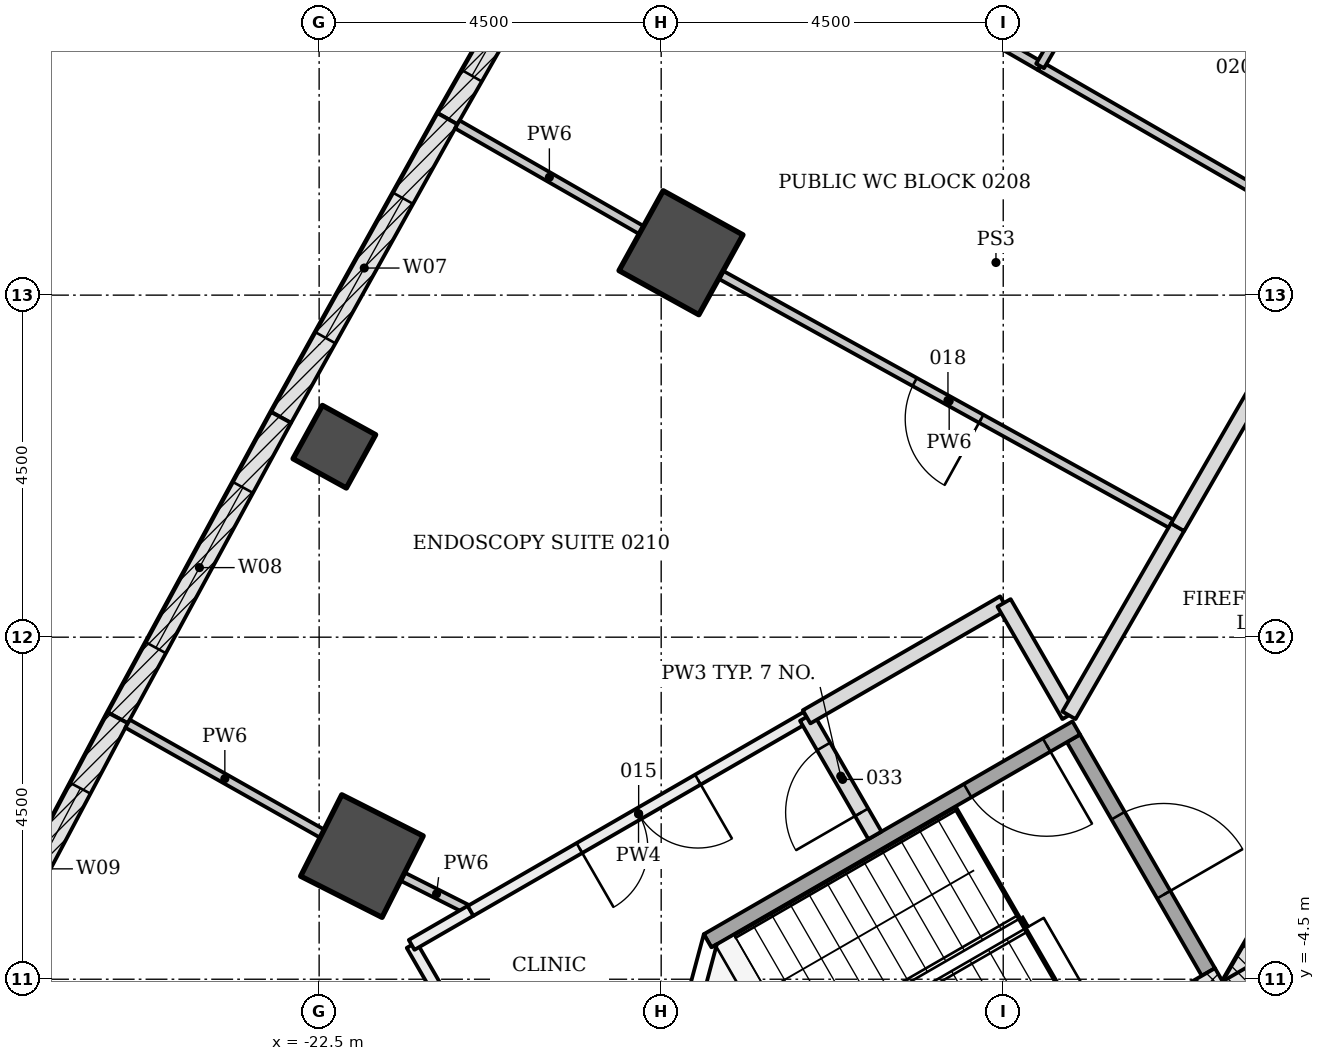
"""IFC4 building model, lengths in metres.
Left out: names, types, materials, properties, quantities, classifications, styles, units other than length and angle.
Written with IfcOpenShell. Run it as: python <this file> out.ifc"""

import sys

from ifc_helpers import new_model, si_unit, direction, frame, frame_2d, origin, origin_2d, place, context, subcontext, project, spatial, polyline, rectangle, outline, extrude, element, fill, save


model = new_model("IFC4")
c1 = context("Model", 3, precision=1e-05, world=origin(), true_north=direction((0.0, 1.0)))
c2 = subcontext(c1, "Body", "Model", "MODEL_VIEW")
j1 = project(units=[si_unit("LENGTHUNIT", "METRE"), si_unit("PLANEANGLEUNIT", "RADIAN")], contexts=[c1])
p1 = place(None, origin())
s1 = spatial("IfcSite", under=j1, at=p1, CompositionType="ELEMENT")
p2 = place(p1, origin())
s2 = spatial("IfcBuilding", under=s1, at=p2, CompositionType="ELEMENT")
p3 = place(p2, frame((0.0, 0.0, 10.5)))
s3 = spatial("IfcBuildingStorey", under=s2, at=p3, CompositionType="ELEMENT", Elevation=10.5)
for number, where, z_axis, x_axis in (
    (1, (-17.739, 5.058, -0.25), (0.0, 0.0, 1.0), (-0.875, 0.484, 0.0)),
    (2, (-21.937, -2.88, -0.25), (0.0, 0.0, 1.0), (-0.893, 0.451, 0.0)),
):
    element("IfcColumn", number, at=place(p3, frame(where, z_axis=z_axis, x_axis=x_axis)), inside=s3, PredefinedType="COLUMN", context=c2, shape_type="SweptSolid", body=[
        extrude(rectangle(XDim=1.2, YDim=1.2, at=origin_2d()), origin(), (0.0, 0.0, 1.0), 4.5),
    ])
p4 = place(p3, frame((-22.3, 2.506, -0.25), z_axis=(0.0, 0.0, 1.0), x_axis=(-0.87611131274, 0.482108875348, 0.0)))
e3 = element("IfcColumn", 3, at=p4, inside=s3, PredefinedType="COLUMN", context=c2, shape_type="SweptSolid", body=[
    extrude(rectangle(XDim=0.8, YDim=0.8, at=origin_2d()), origin(), (0.0, 0.0, 1.0), 4.5),
])
p5 = place(p3, frame((-1.083, 11.281, -0.25), z_axis=(0.0, 0.0, 1.0), x_axis=(-0.500001446645, -0.866024568562, 0.0)))
e4 = element("IfcWall", 4, at=p5, inside=s3, PredefinedType="SHEAR", context=c2, shape_type="SweptSolid", body=[
    extrude(rectangle(XDim=18.458, YDim=0.7, at=frame_2d((9.229, 0.0))), origin(), (0.0, 0.0, 1.0), 4.5),
])
p6 = place(p5, frame((8.979, 0.0, 0.25)))
e5 = element("IfcOpeningElement", 5, at=p6, cuts=e4, PredefinedType="OPENING", context=c2, shape_type="SweptSolid", body=[
    extrude(rectangle(XDim=1.2, YDim=2.1, at=frame_2d((0.6, 1.05))), frame((0.0, 0.36, 0.0), z_axis=(0.0, -1.0, 0.0), x_axis=(1.0, 0.0, 0.0)), (0.0, 0.0, 1.0), 0.72),
])
p7 = place(p5, frame((11.029, 0.0, 0.25)))
e6 = element("IfcOpeningElement", 6, at=p7, cuts=e4, PredefinedType="OPENING", context=c2, shape_type="SweptSolid", body=[
    extrude(rectangle(XDim=1.2, YDim=2.1, at=frame_2d((0.6, 1.05))), frame((0.0, 0.36, 0.0), z_axis=(0.0, -1.0, 0.0), x_axis=(1.0, 0.0, 0.0)), (0.0, 0.0, 1.0), 0.72),
])
p8 = place(p3, frame((-10.311, -4.353, -0.25), z_axis=(0.0, 0.0, 1.0), x_axis=(0.500042739161, -0.866000726912, 0.0)))
e7 = element("IfcWall", 7, at=p8, inside=s3, PredefinedType="SHEAR", context=c2, shape_type="SweptSolid", body=[
    extrude(rectangle(XDim=2.771, YDim=0.7, at=frame_2d((1.386, 0.0))), origin(), (0.0, 0.0, 1.0), 4.5),
])
p9 = place(p3, frame((-20.811, 6.823, 0.0), z_axis=(0.0, 0.0, 1.0), x_axis=(0.495524760411, 0.868593812907, 0.0)))
e8 = element("IfcWall", 8, at=p9, inside=s3, PredefinedType="NOTDEFINED", context=c2, shape_type="SweptSolid", body=[
    extrude(rectangle(XDim=4.496, YDim=0.3, at=frame_2d((2.248, 0.0))), origin(), (0.0, 0.0, 1.0), 4.25),
])
p10 = place(p9, frame((0.648, 0.0, 0.8)))
e9 = element("IfcOpeningElement", 9, at=p10, cuts=e8, PredefinedType="OPENING", context=c2, shape_type="SweptSolid", body=[
    extrude(rectangle(XDim=3.2, YDim=2.7, at=frame_2d((1.6, 1.35))), frame((0.0, 0.16, 0.0), z_axis=(0.0, -1.0, 0.0), x_axis=(1.0, 0.0, 0.0)), (0.0, 0.0, 1.0), 0.32),
])
p11 = place(p3, frame((-23.0, 2.893, 0.0), z_axis=(0.0, 0.0, 1.0), x_axis=(0.486606252415, 0.873621402617, 0.0)))
e10 = element("IfcWall", 10, at=p11, inside=s3, PredefinedType="NOTDEFINED", context=c2, shape_type="SweptSolid", body=[
    extrude(rectangle(XDim=4.496, YDim=0.3, at=frame_2d((2.248, 0.0))), origin(), (0.0, 0.0, 1.0), 4.25),
])
p12 = place(p11, frame((1.198, 0.0, 0.8)))
e11 = element("IfcOpeningElement", 11, at=p12, cuts=e10, PredefinedType="OPENING", context=c2, shape_type="SweptSolid", body=[
    extrude(rectangle(XDim=2.1, YDim=3.0, at=frame_2d((1.05, 1.5))), frame((0.0, 0.16, 0.0), z_axis=(0.0, -1.0, 0.0), x_axis=(1.0, 0.0, 0.0)), (0.0, 0.0, 1.0), 0.32),
])
p13 = place(p3, frame((-25.148, -1.06, 0.0), z_axis=(0.0, 0.0, 1.0), x_axis=(0.477577109439, 0.878589838628, 0.0)))
e12 = element("IfcWall", 12, at=p13, inside=s3, PredefinedType="NOTDEFINED", context=c2, shape_type="SweptSolid", body=[
    extrude(rectangle(XDim=4.496, YDim=0.3, at=frame_2d((2.248, 0.0))), origin(), (0.0, 0.0, 1.0), 4.25),
])
p14 = place(p13, frame((1.048, 0.0, 0.9)))
e13 = element("IfcOpeningElement", 13, at=p14, cuts=e12, PredefinedType="OPENING", context=c2, shape_type="SweptSolid", body=[
    extrude(rectangle(XDim=2.4, YDim=2.4, at=frame_2d((1.2, 1.2))), frame((0.0, 0.16, 0.0), z_axis=(0.0, -1.0, 0.0), x_axis=(1.0, 0.0, 0.0)), (0.0, 0.0, 1.0), 0.32),
])
p15 = place(p3, frame((-27.256, -5.034, 0.0), z_axis=(0.0, 0.0, 1.0), x_axis=(0.468566202388, 0.883428386447, 0.0)))
e14 = element("IfcWall", 14, at=p15, inside=s3, PredefinedType="NOTDEFINED", context=c2, shape_type="SweptSolid", body=[
    extrude(rectangle(XDim=4.496, YDim=0.3, at=frame_2d((2.248, 0.0))), origin(), (0.0, 0.0, 1.0), 4.25),
])
p16 = place(p15, frame((1.048, 0.0, 0.9)))
e15 = element("IfcOpeningElement", 15, at=p16, cuts=e14, PredefinedType="OPENING", context=c2, shape_type="SweptSolid", body=[
    extrude(rectangle(XDim=2.4, YDim=2.4, at=frame_2d((1.2, 1.2))), frame((0.0, 0.16, 0.0), z_axis=(0.0, -1.0, 0.0), x_axis=(1.0, 0.0, 0.0)), (0.0, 0.0, 1.0), 0.32),
])
p17 = place(p3, frame((-12.576, -1.331, -0.25), z_axis=(0.0, 0.0, 1.0), x_axis=(0.499970499736, -0.8660424351, 0.0)))
e16 = element("IfcWall", 16, at=p17, inside=s3, PredefinedType="SHEAR", context=c2, shape_type="SweptSolid", body=[
    extrude(rectangle(XDim=3.55, YDim=0.2, at=frame_2d((1.775, 0.0))), origin(), (0.0, 0.0, 1.0), 4.5),
])
p18 = place(p17, frame((1.175, 0.0, 0.25)))
e17 = element("IfcOpeningElement", 17, at=p18, cuts=e16, PredefinedType="OPENING", context=c2, shape_type="SweptSolid", body=[
    extrude(rectangle(XDim=1.2, YDim=2.1, at=frame_2d((0.6, 1.05))), frame((0.0, 0.11, 0.0), z_axis=(0.0, -1.0, 0.0), x_axis=(1.0, 0.0, 0.0)), (0.0, 0.0, 1.0), 0.22),
])
p19 = place(p3, frame((-12.539, -1.194, -0.25), z_axis=(0.0, 0.0, 1.0), x_axis=(-0.866045472092, -0.499965239061, 0.0)))
e18 = element("IfcWall", 18, at=p19, inside=s3, PredefinedType="SHEAR", context=c2, shape_type="SweptSolid", body=[
    extrude(rectangle(XDim=5.6, YDim=0.2, at=frame_2d((2.8, 0.0))), origin(), (0.0, 0.0, 1.0), 4.5),
])
p20 = place(p19, frame((0.45, 0.0, 0.25)))
e19 = element("IfcOpeningElement", 19, at=p20, cuts=e18, PredefinedType="OPENING", context=c2, shape_type="SweptSolid", body=[
    extrude(rectangle(XDim=1.2, YDim=2.1, at=frame_2d((0.6, 1.05))), frame((0.0, 0.11, 0.0), z_axis=(0.0, -1.0, 0.0), x_axis=(1.0, 0.0, 0.0)), (0.0, 0.0, 1.0), 0.22),
])
p21 = place(p3, frame((-10.43, -4.847, -0.25), z_axis=(0.0, 0.0, 1.0), x_axis=(-0.866018442252, -0.500012057535, 0.0)))
e20 = element("IfcWall", 20, at=p21, inside=s3, PredefinedType="SHEAR", context=c2, shape_type="SweptSolid", body=[
    extrude(rectangle(XDim=7.2, YDim=1.136, at=frame_2d((3.6, 0.0))), origin(), (0.0, 0.0, 1.0), 4.5),
])
p22 = place(p3, frame((0.0, 0.0, -0.25)))
e21 = element("IfcWall", 21, at=p22, inside=s3, PredefinedType="SHEAR", context=c2, shape_type="SweptSolid", body=[
    extrude(outline(polyline([(-17.439, -3.907), (-18.025, -6.093), (-16.95, -7.955), (-16.777, -7.855), (-17.81, -6.065), (-17.267, -4.039), (-17.339, -4.081), (-17.339, -4.081), (-17.339, -4.081), (-17.339, -4.081), (-17.339, -4.081), (-17.339, -4.081), (-17.339, -4.081), (-17.339, -4.081), (-17.339, -4.081), (-17.339, -4.081), (-17.339, -4.081), (-17.339, -4.081), (-17.339, -4.081), (-17.339, -4.081), (-17.339, -4.081), (-17.339, -4.081), (-17.339, -4.081), (-17.439, -3.907)])), origin(), (0.0, 0.0, 1.0), 4.5),
])
p23 = place(p3, frame((-17.941, -9.838, 0.0), z_axis=(0.0, 0.0, 1.0), x_axis=(-0.500048140185, 0.865997608252, 0.0)))
e22 = element("IfcWall", 22, at=p23, inside=s3, PredefinedType="PARTITIONING", context=c2, shape_type="SweptSolid", body=[
    extrude(rectangle(XDim=6.683, YDim=0.15, at=frame_2d((3.342, 0.0))), origin(), (0.0, 0.0, 1.0), 3.638),
])
p24 = place(p23, frame((2.45, 0.0, 0.0)))
e23 = element("IfcOpeningElement", 23, at=p24, cuts=e22, PredefinedType="OPENING", context=c2, shape_type="SweptSolid", body=[
    extrude(rectangle(XDim=1.8, YDim=2.1, at=frame_2d((0.9, 1.05))), frame((0.0, 0.085, 0.0), z_axis=(0.0, -1.0, 0.0), x_axis=(1.0, 0.0, 0.0)), (0.0, 0.0, 1.0), 0.17),
])
p25 = place(p3, frame((-21.283, -4.048, 0.0), z_axis=(0.0, 0.0, 1.0), x_axis=(0.865804825377, 0.500381858538, 0.0)))
e24 = element("IfcWall", 24, at=p25, inside=s3, PredefinedType="PARTITIONING", context=c2, shape_type="SweptSolid", body=[
    extrude(rectangle(XDim=0.897, YDim=0.15, at=frame_2d((0.449, 0.0))), origin(), (0.0, 0.0, 1.0), 3.638),
])
p26 = place(p3, frame((-22.461, -2.584, 0.0), z_axis=(0.0, 0.0, 1.0), x_axis=(-0.870620069476, 0.491955988505, 0.0)))
e25 = element("IfcWall", 25, at=p26, inside=s3, PredefinedType="PARTITIONING", context=c2, shape_type="SweptSolid", body=[
    extrude(rectangle(XDim=2.939, YDim=0.12, at=frame_2d((1.47, 0.0))), origin(), (0.0, 0.0, 1.0), 3.633),
])
p27 = place(p3, frame((-20.509, -3.601, 0.0), z_axis=(0.0, 0.0, 1.0), x_axis=(-0.892710007007, 0.450631604961, 0.0)))
e26 = element("IfcWall", 26, at=p27, inside=s3, PredefinedType="PARTITIONING", context=c2, shape_type="SweptSolid", body=[
    extrude(rectangle(XDim=0.999, YDim=0.12, at=frame_2d((0.5, 0.0))), origin(), (0.0, 0.0, 1.0), 3.638),
])
p28 = place(p3, frame((-16.088, -1.049, 0.0), z_axis=(0.0, 0.0, 1.0), x_axis=(-0.866023883975, -0.500002632377, 0.0)))
e27 = element("IfcWall", 27, at=p28, inside=s3, PredefinedType="PARTITIONING", context=c2, shape_type="SweptSolid", body=[
    extrude(rectangle(XDim=5.104, YDim=0.15, at=frame_2d((2.552, 0.0))), origin(), (0.0, 0.0, 1.0), 3.638),
])
p29 = place(p28, frame((1.65, 0.0, 0.0)))
e28 = element("IfcOpeningElement", 28, at=p29, cuts=e27, PredefinedType="OPENING", context=c2, shape_type="SweptSolid", body=[
    extrude(rectangle(XDim=1.8, YDim=2.1, at=frame_2d((0.9, 1.05))), frame((0.0, 0.085, 0.0), z_axis=(0.0, -1.0, 0.0), x_axis=(1.0, 0.0, 0.0)), (0.0, 0.0, 1.0), 0.17),
])
p30 = place(p3, frame((-15.188, -2.607, 0.0), z_axis=(0.0, 0.0, 1.0), x_axis=(-0.500024172624, 0.866011447264, 0.0)))
e29 = element("IfcWall", 29, at=p30, inside=s3, PredefinedType="PARTITIONING", context=c2, shape_type="SweptSolid", body=[
    extrude(rectangle(XDim=1.798, YDim=0.2, at=frame_2d((0.899, 0.0))), origin(), (0.0, 0.0, 1.0), 3.638),
])
p31 = place(p30, frame((0.35, 0.0, 0.0)))
e30 = element("IfcOpeningElement", 30, at=p31, cuts=e29, PredefinedType="OPENING", context=c2, shape_type="SweptSolid", body=[
    extrude(rectangle(XDim=1.0, YDim=2.1, at=frame_2d((0.5, 1.05))), frame((0.0, 0.11, 0.0), z_axis=(0.0, -1.0, 0.0), x_axis=(1.0, 0.0, 0.0)), (0.0, 0.0, 1.0), 0.22),
])
p32 = place(p3, frame((-16.087, -1.048, 0.0), z_axis=(0.0, 0.0, 1.0), x_axis=(0.865988915629, 0.500063194015, 0.0)))
e31 = element("IfcWall", 31, at=p32, inside=s3, PredefinedType="PARTITIONING", context=c2, shape_type="SweptSolid", body=[
    extrude(rectangle(XDim=2.998, YDim=0.2, at=frame_2d((1.499, 0.0))), origin(), (0.0, 0.0, 1.0), 3.638),
])
p33 = place(p3, frame((-13.489, 0.451, 0.0), z_axis=(0.0, 0.0, 1.0), x_axis=(0.500044178772, -0.865999895656, 0.0)))
e32 = element("IfcWall", 32, at=p33, inside=s3, PredefinedType="PARTITIONING", context=c2, shape_type="SweptSolid", body=[
    extrude(rectangle(XDim=1.708, YDim=0.2, at=frame_2d((0.854, 0.0))), origin(), (0.0, 0.0, 1.0), 4.25),
])
p34 = place(p3, frame((-12.635, -1.028, 0.0), z_axis=(0.0, 0.0, 1.0), x_axis=(0.499801250411, 0.866140121509, 0.0)))
e33 = element("IfcWall", 33, at=p34, inside=s3, PredefinedType="PARTITIONING", context=c2, shape_type="SweptSolid", body=[
    extrude(rectangle(XDim=2.861, YDim=0.2, at=frame_2d((1.431, 0.0))), origin(), (0.0, 0.0, 1.0), 3.638),
])
p35 = place(p3, frame((-18.26, 5.356, 0.0), z_axis=(0.0, 0.0, 1.0), x_axis=(-0.867283853893, 0.49781393791, 0.0)))
e34 = element("IfcWall", 34, at=p35, inside=s3, PredefinedType="PARTITIONING", context=c2, shape_type="SweptSolid", body=[
    extrude(rectangle(XDim=2.792, YDim=0.12, at=frame_2d((1.396, 0.0))), origin(), (0.0, 0.0, 1.0), 3.633),
])
p36 = place(p3, frame((-11.208, 1.446, 0.0), z_axis=(0.0, 0.0, 1.0), x_axis=(-0.875125393946, 0.483896212912, 0.0)))
e35 = element("IfcWall", 35, at=p36, inside=s3, PredefinedType="PARTITIONING", context=c2, shape_type="SweptSolid", body=[
    extrude(rectangle(XDim=6.863, YDim=0.12, at=frame_2d((3.432, 0.0))), origin(), (0.0, 0.0, 1.0), 3.638),
])
p37 = place(p36, frame((2.95, 0.0, 0.0)))
e36 = element("IfcOpeningElement", 36, at=p37, cuts=e35, PredefinedType="OPENING", context=c2, shape_type="SweptSolid", body=[
    extrude(rectangle(XDim=1.0, YDim=2.1, at=frame_2d((0.5, 1.05))), frame((0.0, 0.07, 0.0), z_axis=(0.0, -1.0, 0.0), x_axis=(1.0, 0.0, 0.0)), (0.0, 0.0, 1.0), 0.14),
])
p38 = place(p3, frame((-9.031, 5.213, 0.0), z_axis=(0.0, 0.0, 1.0), x_axis=(-0.500044734646, -0.865999574684, 0.0)))
e37 = element("IfcWall", 37, at=p38, inside=s3, PredefinedType="PARTITIONING", context=c2, shape_type="SweptSolid", body=[
    extrude(rectangle(XDim=4.35, YDim=0.2, at=frame_2d((2.175, 0.0))), origin(), (0.0, 0.0, 1.0), 3.638),
])
p39 = place(p3, frame((-9.032, 5.215, 0.0), z_axis=(0.0, 0.0, 1.0), x_axis=(-0.866130767322, 0.499817460578, 0.0)))
e38 = element("IfcWall", 38, at=p39, inside=s3, PredefinedType="PARTITIONING", context=c2, shape_type="SweptSolid", body=[
    extrude(rectangle(XDim=4.597, YDim=0.12, at=frame_2d((2.299, 0.0))), origin(), (0.0, 0.0, 1.0), 3.638),
])
p40 = place(p3, frame((-13.017, 7.515, 0.0), z_axis=(0.0, 0.0, 1.0), x_axis=(-0.866023771128, 0.500002827834, 0.0)))
e39 = element("IfcWall", 39, at=p40, inside=s3, PredefinedType="PARTITIONING", context=c2, shape_type="SweptSolid", body=[
    extrude(rectangle(XDim=5.226, YDim=0.12, at=frame_2d((2.613, 0.0))), origin(), (0.0, 0.0, 1.0), 3.638),
])
p41 = place(p3, frame((-10.797, 11.355, 0.0), z_axis=(0.0, 0.0, 1.0), x_axis=(-0.500117989508, -0.865957271793, 0.0)))
e40 = element("IfcWall", 40, at=p41, inside=s3, PredefinedType="PARTITIONING", context=c2, shape_type="SweptSolid", body=[
    extrude(rectangle(XDim=4.435, YDim=0.12, at=frame_2d((2.217, 0.0))), origin(), (0.0, 0.0, 1.0), 3.638),
])
p42 = place(p41, frame((1.75, 0.0, 0.0)))
e41 = element("IfcOpeningElement", 41, at=p42, cuts=e40, PredefinedType="OPENING", context=c2, shape_type="SweptSolid", body=[
    extrude(rectangle(XDim=1.0, YDim=2.1, at=frame_2d((0.5, 1.05))), frame((0.0, 0.07, 0.0), z_axis=(0.0, -1.0, 0.0), x_axis=(1.0, 0.0, 0.0)), (0.0, 0.0, 1.0), 0.14),
])
p43 = place(p10, origin())
e42 = element("IfcWindow", 42, at=p43, inside=s3, PartitioningType="TRIPLE_PANEL_VERTICAL", PredefinedType="WINDOW", context=c2, shape_type="SweptSolid", body=[
    extrude(rectangle(XDim=3.2, YDim=2.7, at=frame_2d((1.6, 1.35))), frame((0.0, 0.03, 0.0), z_axis=(0.0, -1.0, 0.0), x_axis=(1.0, 0.0, 0.0)), (0.0, 0.0, 1.0), 0.06),
])
fill(e9, e42)
p44 = place(p12, origin())
e43 = element("IfcWindow", 43, at=p44, inside=s3, PartitioningType="DOUBLE_PANEL_HORIZONTAL", PredefinedType="WINDOW", context=c2, shape_type="SweptSolid", body=[
    extrude(rectangle(XDim=2.1, YDim=3.0, at=frame_2d((1.05, 1.5))), frame((0.0, 0.03, 0.0), z_axis=(0.0, -1.0, 0.0), x_axis=(1.0, 0.0, 0.0)), (0.0, 0.0, 1.0), 0.06),
])
fill(e11, e43)
p45 = place(p14, origin())
e44 = element("IfcWindow", 44, at=p45, inside=s3, PartitioningType="DOUBLE_PANEL_VERTICAL", PredefinedType="WINDOW", context=c2, shape_type="SweptSolid", body=[
    extrude(rectangle(XDim=2.4, YDim=2.4, at=frame_2d((1.2, 1.2))), frame((0.0, 0.03, 0.0), z_axis=(0.0, -1.0, 0.0), x_axis=(1.0, 0.0, 0.0)), (0.0, 0.0, 1.0), 0.06),
])
fill(e13, e44)
p46 = place(p16, origin())
e45 = element("IfcWindow", 45, at=p46, inside=s3, PartitioningType="DOUBLE_PANEL_VERTICAL", PredefinedType="WINDOW", context=c2, shape_type="SweptSolid", body=[
    extrude(rectangle(XDim=2.4, YDim=2.4, at=frame_2d((1.2, 1.2))), frame((0.0, 0.03, 0.0), z_axis=(0.0, -1.0, 0.0), x_axis=(1.0, 0.0, 0.0)), (0.0, 0.0, 1.0), 0.06),
])
fill(e15, e45)
p47 = place(p18, origin())
e46 = element("IfcDoor", 46, at=p47, inside=s3, OperationType="SINGLE_SWING_RIGHT", PredefinedType="DOOR", context=c2, shape_type="SweptSolid", body=[
    extrude(rectangle(XDim=1.2, YDim=2.1, at=frame_2d((0.6, 1.05))), frame((0.0, 0.025, 0.0), z_axis=(0.0, -1.0, 0.0), x_axis=(1.0, 0.0, 0.0)), (0.0, 0.0, 1.0), 0.05),
])
fill(e17, e46)
p48 = place(p20, origin())
e47 = element("IfcDoor", 47, at=p48, inside=s3, OperationType="SINGLE_SWING_LEFT", PredefinedType="DOOR", context=c2, shape_type="SweptSolid", body=[
    extrude(rectangle(XDim=1.2, YDim=2.1, at=frame_2d((0.6, 1.05))), frame((0.0, 0.025, 0.0), z_axis=(0.0, -1.0, 0.0), x_axis=(1.0, 0.0, 0.0)), (0.0, 0.0, 1.0), 0.05),
])
fill(e19, e47)
p49 = place(p29, origin())
e48 = element("IfcDoor", 48, at=p49, inside=s3, OperationType="DOUBLE_DOOR_SINGLE_SWING", PredefinedType="DOOR", context=c2, shape_type="SweptSolid", body=[
    extrude(rectangle(XDim=1.8, YDim=2.1, at=frame_2d((0.9, 1.05))), frame((0.0, 0.025, 0.0), z_axis=(0.0, -1.0, 0.0), x_axis=(1.0, 0.0, 0.0)), (0.0, 0.0, 1.0), 0.05),
])
fill(e28, e48)
p50 = place(p37, origin())
e49 = element("IfcDoor", 49, at=p50, inside=s3, OperationType="SINGLE_SWING_LEFT", PredefinedType="DOOR", context=c2, shape_type="SweptSolid", body=[
    extrude(rectangle(XDim=1.0, YDim=2.1, at=frame_2d((0.5, 1.05))), frame((0.0, 0.025, 0.0), z_axis=(0.0, -1.0, 0.0), x_axis=(1.0, 0.0, 0.0)), (0.0, 0.0, 1.0), 0.05),
])
fill(e36, e49)
p51 = place(p31, origin())
e50 = element("IfcDoor", 50, at=p51, inside=s3, OperationType="SINGLE_SWING_LEFT", PredefinedType="DOOR", context=c2, shape_type="SweptSolid", body=[
    extrude(rectangle(XDim=1.0, YDim=2.1, at=frame_2d((0.5, 1.05))), frame((0.0, 0.025, 0.0), z_axis=(0.0, -1.0, 0.0), x_axis=(1.0, 0.0, 0.0)), (0.0, 0.0, 1.0), 0.05),
])
fill(e30, e50)
save(model, sys.argv[1])
